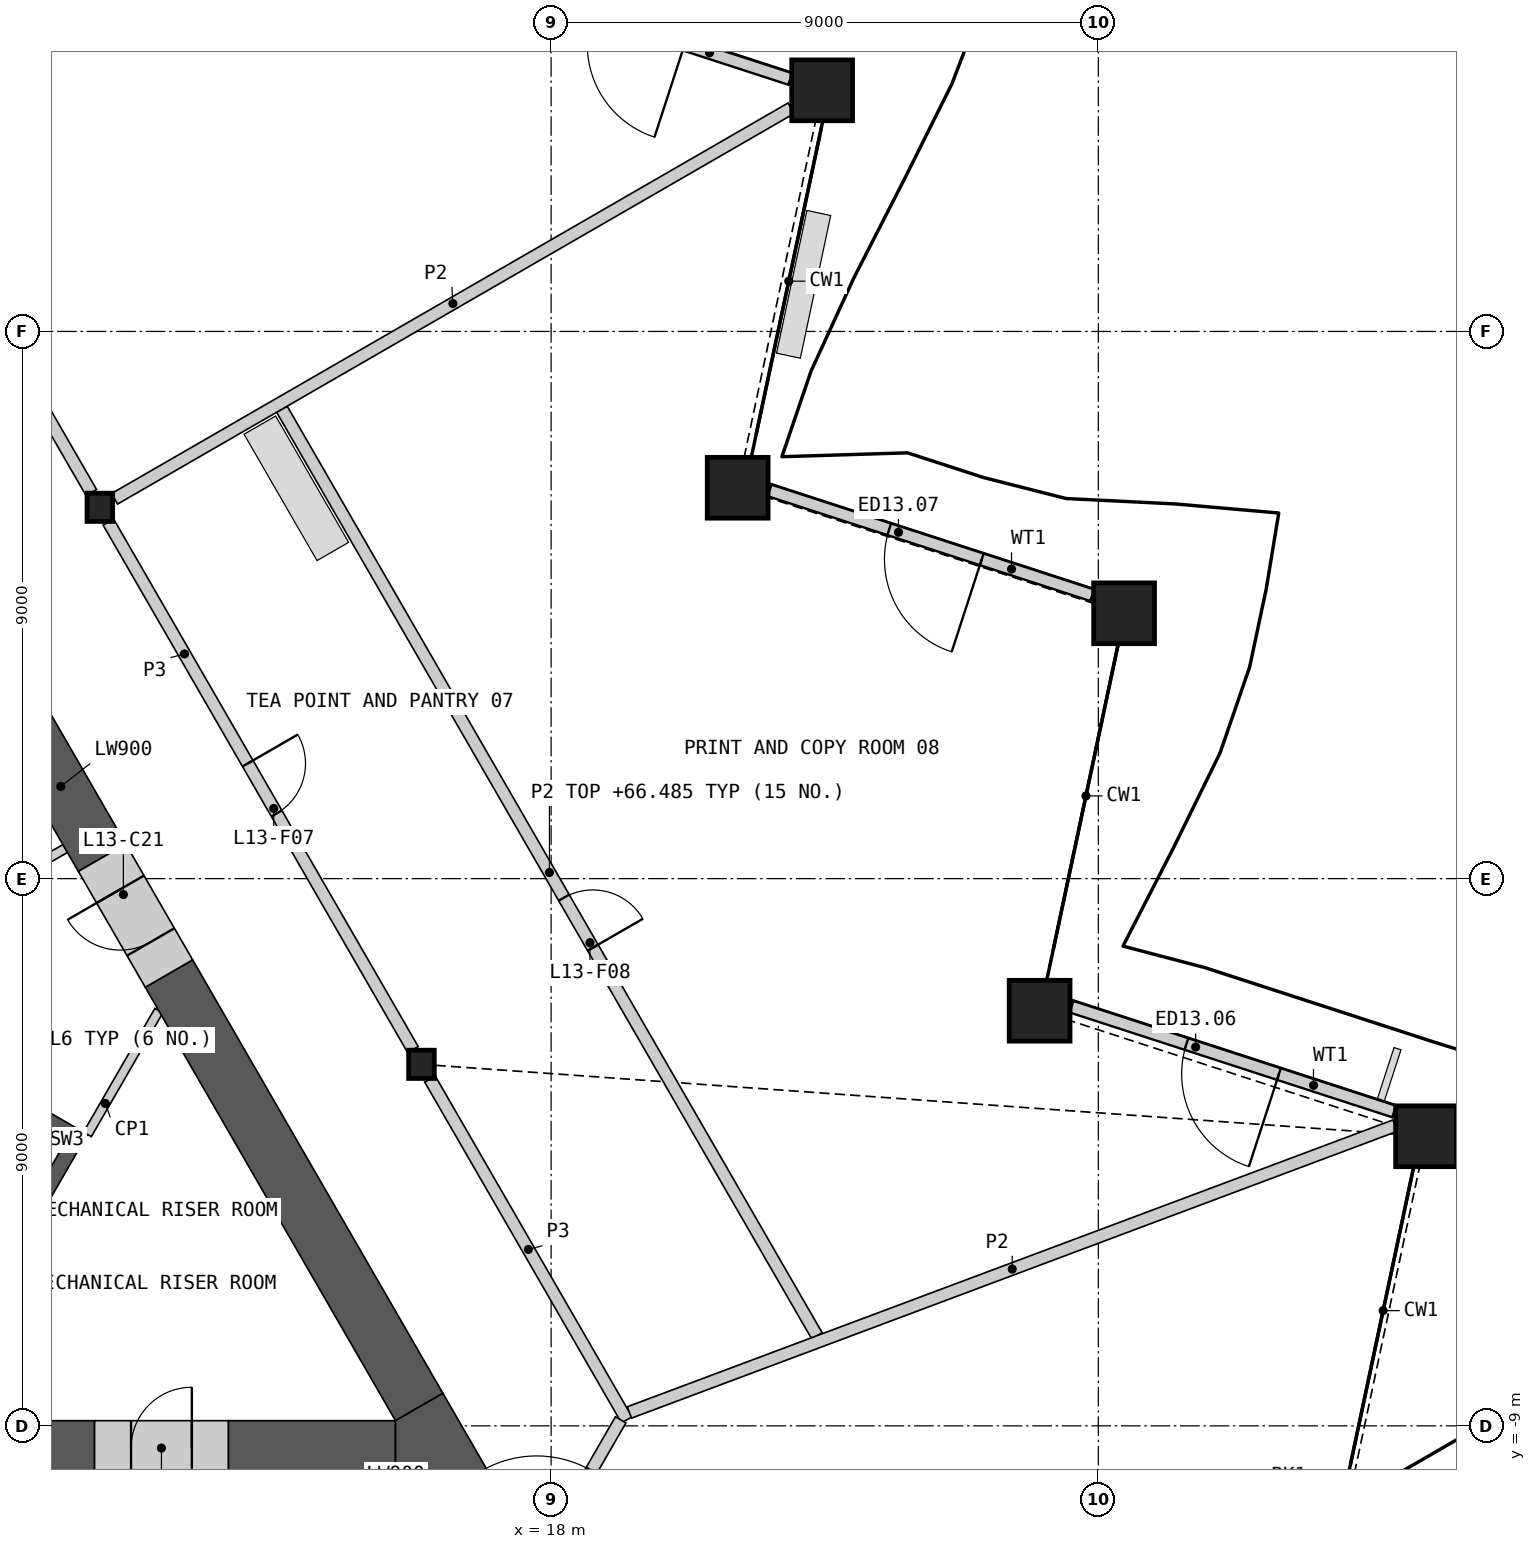
"""IFC4 building model, lengths in metres.
Left out: names, types, materials, properties, quantities, classifications, styles, units other than length and angle.
Written with IfcOpenShell. Run it as: python <this file> out.ifc"""

import sys

from ifc_helpers import new_model, si_unit, direction, frame, frame_2d, origin, origin_2d, place, context, subcontext, project, spatial, polyline, rectangle, hollow_rectangle, i_section, outline, extrude, element, fill, save


model = new_model("IFC4")
c1 = context("Model", 3, precision=1e-05, world=origin(), true_north=direction((0.0, 1.0)))
c2 = subcontext(c1, "Body", "Model", "MODEL_VIEW")
j1 = project(units=[si_unit("LENGTHUNIT", "METRE"), si_unit("PLANEANGLEUNIT", "RADIAN")], contexts=[c1])
p1 = place(None, origin())
s1 = spatial("IfcSite", under=j1, at=p1, CompositionType="ELEMENT")
p2 = place(p1, origin())
s2 = spatial("IfcBuilding", under=s1, at=p2, CompositionType="ELEMENT")
p3 = place(p2, frame((0.0, 0.0, 63.6)))
s3 = spatial("IfcBuildingStorey", under=s2, at=p3, CompositionType="ELEMENT", Elevation=63.6)
for number, where, z_axis, x_axis in (
    (1, (32.389, -4.237, 0.0), (0.0, 0.0, 1.0), (1.0, 0.0, 0.0)),
    (2, (26.034, -2.172, 0.0), (0.0, 0.0, 1.0), (1.0, 0.0, 0.0)),
    (3, (27.423, 4.364, 0.0), (0.0, 0.0, 1.0), (1.0, 0.0, 0.0)),
    (4, (21.068, 6.429, 0.0), (0.0, 0.0, 1.0), (1.0, 0.0, 0.0)),
    (5, (22.457, 12.966, 0.0), (0.0, 0.0, 1.0), (1.0, 0.0, 0.0)),
):
    element("IfcColumn", number, at=place(p3, frame(where, z_axis=z_axis, x_axis=x_axis)), inside=s3, PredefinedType="COLUMN", context=c2, shape_type="SweptSolid", body=[
        extrude(hollow_rectangle(XDim=1.0, YDim=1.0, WallThickness=0.07, at=origin_2d()), origin(), (0.0, 0.0, 1.0), 4.2),
    ])
for number, where, z_axis, x_axis in (
    (6, (15.868, -3.054, 0.0), (0.0, 0.0, 1.0), (1.0, 0.0, 0.0)),
    (7, (10.578, 6.107, 0.0), (0.0, 0.0, 1.0), (1.0, 0.0, 0.0)),
):
    element("IfcColumn", number, at=place(p3, frame(where, z_axis=z_axis, x_axis=x_axis)), inside=s3, PredefinedType="COLUMN", context=c2, shape_type="SweptSolid", body=[
        extrude(i_section(OverallWidth=0.421, OverallDepth=0.465, WebThickness=0.045, FlangeThickness=0.072, at=origin_2d()), origin(), (0.0, 0.0, 1.0), 4.2),
    ])
p4 = place(p3, frame((31.865, -3.83, 0.0), z_axis=(0.0, 0.0, 1.0), x_axis=(-0.951054004345, 0.309024725255, 0.0)))
e8 = element("IfcWall", 8, at=p4, inside=s3, PredefinedType="SOLIDWALL", context=c2, shape_type="SweptSolid", body=[
    extrude(rectangle(XDim=5.579, YDim=0.2, at=frame_2d((2.79, 0.0))), origin(), (0.0, 0.0, 1.0), 3.189),
])
p5 = place(p4, frame((1.992, 0.0, 0.0)))
e9 = element("IfcOpeningElement", 9, at=p5, cuts=e8, PredefinedType="OPENING", context=c2, shape_type="SweptSolid", body=[
    extrude(rectangle(XDim=1.6, YDim=2.4, at=frame_2d((0.8, 1.2))), frame((0.0, 0.11, 0.0), z_axis=(0.0, -1.0, 0.0), x_axis=(1.0, 0.0, 0.0)), (0.0, 0.0, 1.0), 0.22),
])
p6 = place(p3, frame((26.899, 4.661, 0.0), z_axis=(0.0, 0.0, 1.0), x_axis=(-0.951054004345, 0.309024725255, 0.0)))
e10 = element("IfcWall", 10, at=p6, inside=s3, PredefinedType="SOLIDWALL", context=c2, shape_type="SweptSolid", body=[
    extrude(rectangle(XDim=5.579, YDim=0.2, at=frame_2d((2.79, 0.0))), origin(), (0.0, 0.0, 1.0), 3.189),
])
p7 = place(p6, frame((1.91, 0.0, 0.0)))
e11 = element("IfcOpeningElement", 11, at=p7, cuts=e10, PredefinedType="OPENING", context=c2, shape_type="SweptSolid", body=[
    extrude(rectangle(XDim=1.6, YDim=2.4, at=frame_2d((0.8, 1.2))), frame((0.0, 0.11, 0.0), z_axis=(0.0, -1.0, 0.0), x_axis=(1.0, 0.0, 0.0)), (0.0, 0.0, 1.0), 0.22),
])
p8 = place(p3, frame((21.933, 13.153, 0.0), z_axis=(0.0, 0.0, 1.0), x_axis=(-0.951066864375, 0.308985144444, 0.0)))
e12 = element("IfcWall", 12, at=p8, inside=s3, PredefinedType="SOLIDWALL", context=c2, shape_type="SweptSolid", body=[
    extrude(rectangle(XDim=5.579, YDim=0.2, at=frame_2d((2.79, 0.0))), origin(), (0.0, 0.0, 1.0), 3.189),
])
p9 = place(p8, frame((1.828, 0.0, 0.0)))
e13 = element("IfcOpeningElement", 13, at=p9, cuts=e12, PredefinedType="OPENING", context=c2, shape_type="SweptSolid", body=[
    extrude(rectangle(XDim=1.6, YDim=2.4, at=frame_2d((0.8, 1.2))), frame((0.0, 0.11, 0.0), z_axis=(0.0, -1.0, 0.0), x_axis=(1.0, 0.0, 0.0)), (0.0, 0.0, 1.0), 0.22),
])
p10 = place(p3, origin())
e14 = element("IfcWall", 14, at=p10, inside=s3, PredefinedType="SHEAR", context=c2, shape_type="SweptSolid", body=[
    extrude(outline(polyline([(8.83, -6.881), (10.374, -4.206), (10.032, -4.298), (8.738, -6.539), (8.83, -6.881)])), origin(), (0.0, 0.0, 1.0), 3.8),
])
p11 = place(p3, origin())
e15 = element("IfcWall", 15, at=p11, inside=s3, PredefinedType="SHEAR", context=c2, shape_type="SweptSolid", body=[
    extrude(outline(polyline([(10.032, -4.298), (10.374, -4.206), (5.307, -1.281), (5.182, -1.498), (10.032, -4.298)])), origin(), (0.0, 0.0, 1.0), 3.8),
])
p12 = place(p3, frame((8.268, -0.509, 0.0), z_axis=(0.0, 0.0, 1.0), x_axis=(0.866035824272, 0.499981950752, 0.0)))
e16 = element("IfcWall", 16, at=p12, inside=s3, PredefinedType="PARTITIONING", context=c2, shape_type="SweptSolid", body=[
    extrude(rectangle(XDim=2.009, YDim=0.15, at=frame_2d((1.004, 0.0))), origin(), (0.0, 0.0, 1.0), 3.8),
])
p13 = place(p3, frame((10.374, -4.206, 0.0), z_axis=(0.0, 0.0, 1.0), x_axis=(0.499995339376, 0.86602809458, 0.0)))
e17 = element("IfcWall", 17, at=p13, inside=s3, PredefinedType="PARTITIONING", context=c2, shape_type="SweptSolid", body=[
    extrude(rectangle(XDim=2.349, YDim=0.15, at=frame_2d((1.175, 0.0))), origin(), (0.0, 0.0, 1.0), 3.8),
])
p14 = place(p3, frame((7.209, -9.365, 0.0), z_axis=(0.0, 0.0, 1.0), x_axis=(1.0, 0.0, 0.0)))
e18 = element("IfcWall", 18, at=p14, inside=s3, PredefinedType="SHEAR", context=c2, shape_type="SweptSolid", body=[
    extrude(rectangle(XDim=3.282, YDim=0.9, at=frame_2d((1.641, 0.0))), origin(), (0.0, 0.0, 1.0), 3.8),
])
p15 = place(p3, frame((12.691, -9.365, 0.0), z_axis=(0.0, 0.0, 1.0), x_axis=(1.0, 0.0, 0.0)))
e19 = element("IfcWall", 19, at=p15, inside=s3, PredefinedType="SHEAR", context=c2, shape_type="SweptSolid", body=[
    extrude(rectangle(XDim=2.75, YDim=0.9, at=frame_2d((1.375, 0.0))), origin(), (0.0, 0.0, 1.0), 3.8),
])
p16 = place(p3, frame((15.831, -8.69, 0.0), z_axis=(0.0, 0.0, 1.0), x_axis=(-0.499995435471, 0.8660280391, 0.0)))
e20 = element("IfcWall", 20, at=p16, inside=s3, PredefinedType="SHEAR", context=c2, shape_type="SweptSolid", body=[
    extrude(rectangle(XDim=8.232, YDim=0.9, at=frame_2d((4.116, 0.0))), origin(), (0.0, 0.0, 1.0), 3.8),
])
p17 = place(p3, frame((10.615, 0.344, 0.0), z_axis=(0.0, 0.0, 1.0), x_axis=(-0.500044870432, 0.865999496279, 0.0)))
e21 = element("IfcWall", 21, at=p17, inside=s3, PredefinedType="SHEAR", context=c2, shape_type="SweptSolid", body=[
    extrude(rectangle(XDim=2.709, YDim=0.9, at=frame_2d((1.354, 0.0))), origin(), (0.0, 0.0, 1.0), 3.8),
])
p18 = place(p3, origin())
e22 = element("IfcWall", 22, at=p18, inside=s3, PredefinedType="SHEAR", context=c2, shape_type="SweptSolid", body=[
    extrude(outline(polyline([(15.441, -9.815), (15.441, -8.915), (16.221, -8.465), (17.0, -9.815), (15.441, -9.815)])), origin(), (0.0, 0.0, 1.0), 3.8),
])
p19 = place(p3, frame((10.491, -9.365, 0.0), z_axis=(0.0, 0.0, 1.0), x_axis=(1.0, 0.0, 0.0)))
e23 = element("IfcWall", 23, at=p19, inside=s3, PredefinedType="SHEAR", context=c2, shape_type="SweptSolid", body=[
    extrude(rectangle(XDim=2.2, YDim=0.9, at=frame_2d((1.1, 0.0))), origin(), (0.0, 0.0, 1.0), 3.8),
])
p20 = place(p19, frame((0.6, 0.0, 0.0)))
e24 = element("IfcOpeningElement", 24, at=p20, cuts=e23, PredefinedType="OPENING", context=c2, shape_type="SweptSolid", body=[
    extrude(rectangle(XDim=1.0, YDim=2.1, at=frame_2d((0.5, 1.05))), frame((0.0, 0.46, 0.0), z_axis=(0.0, -1.0, 0.0), x_axis=(1.0, 0.0, 0.0)), (0.0, 0.0, 1.0), 0.92),
])
p21 = place(p3, frame((11.715, -1.561, 0.0), z_axis=(0.0, 0.0, 1.0), x_axis=(-0.499946605688, 0.86605622881, 0.0)))
e25 = element("IfcWall", 25, at=p21, inside=s3, PredefinedType="SHEAR", context=c2, shape_type="SweptSolid", body=[
    extrude(rectangle(XDim=2.2, YDim=0.9, at=frame_2d((1.1, 0.0))), origin(), (0.0, 0.0, 1.0), 3.8),
])
p22 = place(p21, frame((0.6, 0.0, 0.0)))
e26 = element("IfcOpeningElement", 26, at=p22, cuts=e25, PredefinedType="OPENING", context=c2, shape_type="SweptSolid", body=[
    extrude(rectangle(XDim=1.0, YDim=2.1, at=frame_2d((0.5, 1.05))), frame((0.0, 0.46, 0.0), z_axis=(0.0, -1.0, 0.0), x_axis=(1.0, 0.0, 0.0)), (0.0, 0.0, 1.0), 0.92),
])
p23 = place(p3, frame((5.429, 15.026, 0.0), z_axis=(0.0, 0.0, 1.0), x_axis=(0.50001002959, -0.86601961312, 0.0)))
e27 = element("IfcWall", 27, at=p23, inside=s3, PredefinedType="PARTITIONING", context=c2, shape_type="SweptSolid", body=[
    extrude(rectangle(XDim=10.019, YDim=0.2, at=frame_2d((5.009, 0.0))), origin(), (0.0, 0.0, 1.0), 3.8),
])
p24 = place(p23, frame((4.059, 0.0, 0.0)))
e28 = element("IfcOpeningElement", 28, at=p24, cuts=e27, PredefinedType="OPENING", context=c2, shape_type="SweptSolid", body=[
    extrude(rectangle(XDim=1.8, YDim=2.1, at=frame_2d((0.9, 1.05))), frame((0.0, 0.11, 0.0), z_axis=(0.0, -1.0, 0.0), x_axis=(1.0, 0.0, 0.0)), (0.0, 0.0, 1.0), 0.22),
])
p25 = place(p3, frame((10.719, 5.865, 0.0), z_axis=(0.0, 0.0, 1.0), x_axis=(0.49999175339, -0.866030164915, 0.0)))
e29 = element("IfcWall", 29, at=p25, inside=s3, PredefinedType="PARTITIONING", context=c2, shape_type="SweptSolid", body=[
    extrude(rectangle(XDim=10.019, YDim=0.2, at=frame_2d((5.009, 0.0))), origin(), (0.0, 0.0, 1.0), 3.8),
])
p26 = place(p25, frame((4.585, 0.0, 0.0)))
e30 = element("IfcOpeningElement", 30, at=p26, cuts=e29, PredefinedType="OPENING", context=c2, shape_type="SweptSolid", body=[
    extrude(rectangle(XDim=0.95, YDim=2.1, at=frame_2d((0.475, 1.05))), frame((0.0, 0.11, 0.0), z_axis=(0.0, -1.0, 0.0), x_axis=(1.0, 0.0, 0.0)), (0.0, 0.0, 1.0), 0.22),
])
p27 = place(p3, frame((16.008, -3.296, 0.0), z_axis=(0.0, 0.0, 1.0), x_axis=(0.499984737558, -0.86603421538, 0.0)))
e31 = element("IfcWall", 31, at=p27, inside=s3, PredefinedType="PARTITIONING", context=c2, shape_type="SweptSolid", body=[
    extrude(rectangle(XDim=6.473, YDim=0.2, at=frame_2d((3.236, 0.0))), origin(), (0.0, 0.0, 1.0), 3.8),
])
p28 = place(p3, frame((17.281, -12.128, 0.0), z_axis=(0.0, 0.0, 1.0), x_axis=(0.499958791762, 0.866049194065, 0.0)))
e32 = element("IfcWall", 32, at=p28, inside=s3, PredefinedType="PARTITIONING", context=c2, shape_type="SweptSolid", body=[
    extrude(rectangle(XDim=3.726, YDim=0.2, at=frame_2d((1.863, 0.0))), origin(), (0.0, 0.0, 1.0), 3.8),
])
p29 = place(p28, frame((0.963, 0.0, 0.0)))
e33 = element("IfcOpeningElement", 33, at=p29, cuts=e32, PredefinedType="OPENING", context=c2, shape_type="SweptSolid", body=[
    extrude(rectangle(XDim=1.8, YDim=2.1, at=frame_2d((0.9, 1.05))), frame((0.0, 0.11, 0.0), z_axis=(0.0, -1.0, 0.0), x_axis=(1.0, 0.0, 0.0)), (0.0, 0.0, 1.0), 0.22),
])
p30 = place(p3, frame((13.573, 7.721, 0.0), z_axis=(0.0, 0.0, 1.0), x_axis=(0.499990262232, -0.866031025814, 0.0)))
e34 = element("IfcWall", 34, at=p30, inside=s3, PredefinedType="PARTITIONING", context=c2, shape_type="SweptSolid", body=[
    extrude(rectangle(XDim=17.597, YDim=0.2, at=frame_2d((8.799, 0.0))), origin(), (0.0, 0.0, 1.0), 2.885),
])
p31 = place(p30, frame((9.277, 0.0, 0.0)))
e35 = element("IfcOpeningElement", 35, at=p31, cuts=e34, PredefinedType="OPENING", context=c2, shape_type="SweptSolid", body=[
    extrude(rectangle(XDim=0.95, YDim=2.1, at=frame_2d((0.475, 1.05))), frame((0.0, 0.11, 0.0), z_axis=(0.0, -1.0, 0.0), x_axis=(1.0, 0.0, 0.0)), (0.0, 0.0, 1.0), 0.22),
])
p32 = place(p3, frame((19.288, -8.78, 0.0), z_axis=(0.0, 0.0, 1.0), x_axis=(0.93644254502, 0.350820979814, 0.0)))
e36 = element("IfcWall", 36, at=p32, inside=s3, PredefinedType="PARTITIONING", context=c2, shape_type="SweptSolid", body=[
    extrude(rectangle(XDim=13.447, YDim=0.2, at=frame_2d((6.723, 0.0))), origin(), (0.0, 0.0, 1.0), 2.885),
])
p33 = place(p3, frame((10.821, 6.247, 0.0), z_axis=(0.0, 0.0, 1.0), x_axis=(0.866026729935, 0.499997703033, 0.0)))
e37 = element("IfcWall", 37, at=p33, inside=s3, PredefinedType="PARTITIONING", context=c2, shape_type="SweptSolid", body=[
    extrude(rectangle(XDim=12.848, YDim=0.2, at=frame_2d((6.424, 0.0))), origin(), (0.0, 0.0, 1.0), 2.885),
])
p34 = place(p5, origin())
e38 = element("IfcDoor", 38, at=p34, inside=s3, OperationType="DOUBLE_DOOR_SINGLE_SWING", PredefinedType="DOOR", context=c2, shape_type="SweptSolid", body=[
    extrude(rectangle(XDim=1.6, YDim=2.4, at=frame_2d((0.8, 1.2))), frame((0.0, 0.025, 0.0), z_axis=(0.0, -1.0, 0.0), x_axis=(1.0, 0.0, 0.0)), (0.0, 0.0, 1.0), 0.05),
])
fill(e9, e38)
p35 = place(p7, origin())
e39 = element("IfcDoor", 39, at=p35, inside=s3, OperationType="DOUBLE_DOOR_SINGLE_SWING", PredefinedType="DOOR", context=c2, shape_type="SweptSolid", body=[
    extrude(rectangle(XDim=1.6, YDim=2.4, at=frame_2d((0.8, 1.2))), frame((0.0, 0.025, 0.0), z_axis=(0.0, -1.0, 0.0), x_axis=(1.0, 0.0, 0.0)), (0.0, 0.0, 1.0), 0.05),
])
fill(e11, e39)
p36 = place(p20, origin())
e40 = element("IfcDoor", 40, at=p36, inside=s3, OperationType="SINGLE_SWING_RIGHT", PredefinedType="DOOR", context=c2, shape_type="SweptSolid", body=[
    extrude(rectangle(XDim=1.0, YDim=2.1, at=frame_2d((0.5, 1.05))), frame((0.0, 0.205, 0.0), z_axis=(0.0, -1.0, 0.0), x_axis=(1.0, 0.0, 0.0)), (0.0, 0.0, 1.0), 0.05),
])
fill(e24, e40)
p37 = place(p22, origin())
e41 = element("IfcDoor", 41, at=p37, inside=s3, OperationType="SINGLE_SWING_RIGHT", PredefinedType="DOOR", context=c2, shape_type="SweptSolid", body=[
    extrude(rectangle(XDim=1.0, YDim=2.1, at=frame_2d((0.5, 1.05))), frame((0.0, 0.205, 0.0), z_axis=(0.0, -1.0, 0.0), x_axis=(1.0, 0.0, 0.0)), (0.0, 0.0, 1.0), 0.05),
])
fill(e26, e41)
p38 = place(p26, origin())
e42 = element("IfcDoor", 42, at=p38, inside=s3, OperationType="SINGLE_SWING_LEFT", PredefinedType="DOOR", context=c2, shape_type="SweptSolid", body=[
    extrude(rectangle(XDim=0.95, YDim=2.1, at=frame_2d((0.475, 1.05))), frame((0.0, 0.025, 0.0), z_axis=(0.0, -1.0, 0.0), x_axis=(1.0, 0.0, 0.0)), (0.0, 0.0, 1.0), 0.05),
])
fill(e30, e42)
p39 = place(p31, origin())
e43 = element("IfcDoor", 43, at=p39, inside=s3, OperationType="SINGLE_SWING_RIGHT", PredefinedType="DOOR", context=c2, shape_type="SweptSolid", body=[
    extrude(rectangle(XDim=0.95, YDim=2.1, at=frame_2d((0.475, 1.05))), frame((0.0, 0.025, 0.0), z_axis=(0.0, -1.0, 0.0), x_axis=(1.0, 0.0, 0.0)), (0.0, 0.0, 1.0), 0.05),
])
fill(e35, e43)
save(model, sys.argv[1])
